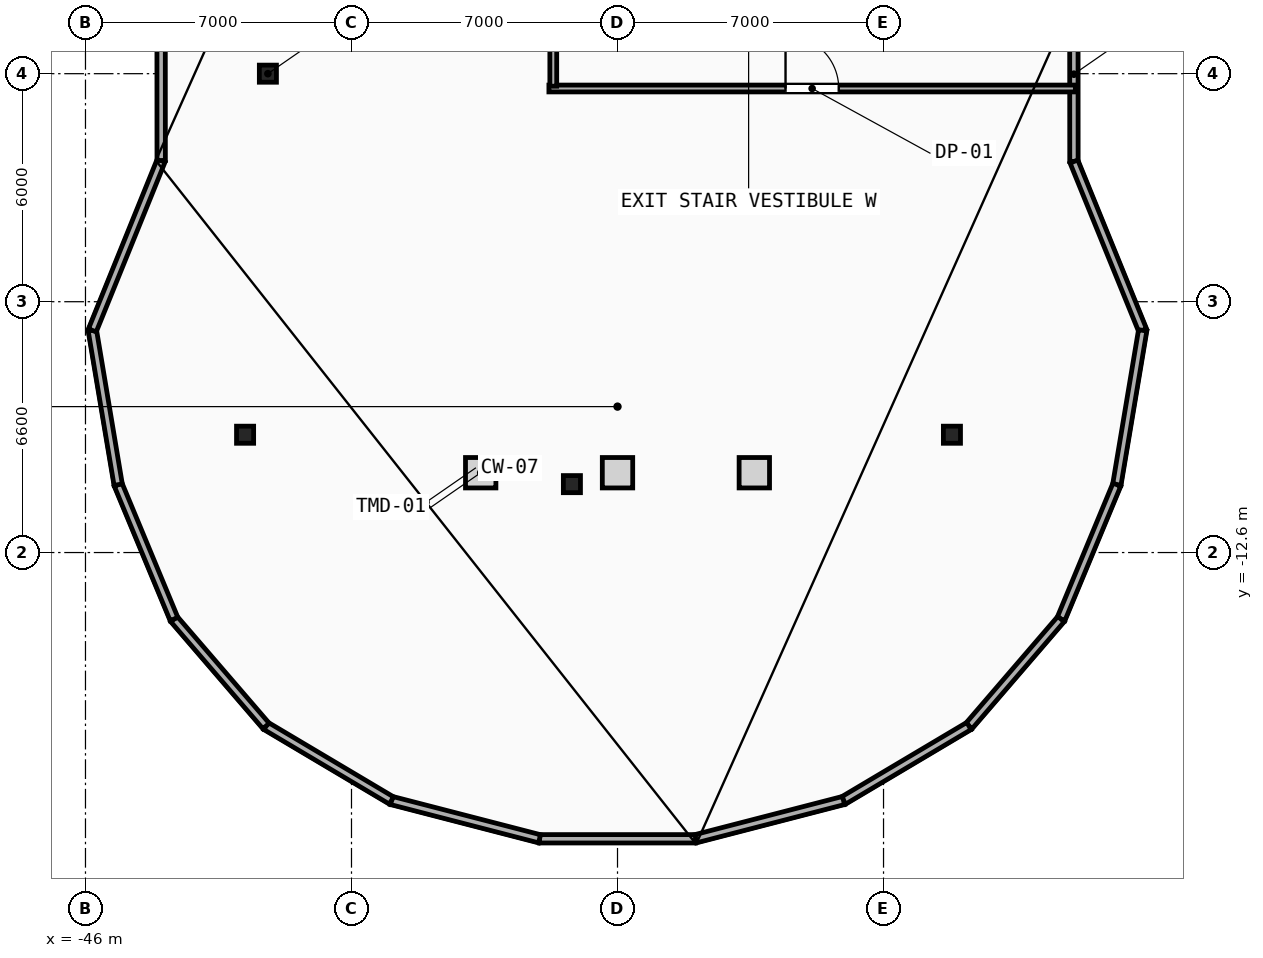
"""IFC4 building model, lengths in metres.
Left out: names, types, materials, properties, quantities, classifications, styles, units other than length and angle.
Written with IfcOpenShell. Run it as: python <this file> out.ifc"""

import sys

from ifc_helpers import new_model, si_unit, direction, frame, frame_2d, origin, origin_2d, place, context, subcontext, project, spatial, rectangle, hollow_rectangle, extrude, element, fill, save


model = new_model("IFC4")
c1 = context("Model", 3, precision=1e-05, world=origin(), true_north=direction((0.0, 1.0)))
c2 = subcontext(c1, "Body", "Model", "MODEL_VIEW")
j1 = project(units=[si_unit("LENGTHUNIT", "METRE"), si_unit("PLANEANGLEUNIT", "RADIAN")], contexts=[c1])
p1 = place(None, origin())
s1 = spatial("IfcSite", under=j1, at=p1, CompositionType="ELEMENT")
p2 = place(p1, origin())
s2 = spatial("IfcBuilding", under=s1, at=p2, CompositionType="ELEMENT")
p3 = place(p2, frame((0.0, 0.0, 286.4)))
s3 = spatial("IfcBuildingStorey", under=s2, at=p3, CompositionType="ELEMENT", Elevation=286.4)
for number, where, z_axis, x_axis in (
    (1, (-41.2, 0.0, 0.0), (0.0, 0.0, 1.0), (1.0, 0.0, 0.0)),
    (2, (-41.8, -9.5, 0.0), (0.0, 0.0, 1.0), (1.0, 0.0, 0.0)),
    (3, (-33.2, -10.8, 0.0), (0.0, 0.0, 1.0), (1.0, 0.0, 0.0)),
    (4, (-23.2, -9.5, 0.0), (0.0, 0.0, 1.0), (1.0, 0.0, 0.0)),
):
    element("IfcColumn", number, at=place(p3, frame(where, z_axis=z_axis, x_axis=x_axis)), inside=s3, PredefinedType="COLUMN", context=c2, shape_type="SweptSolid", body=[
        extrude(hollow_rectangle(XDim=0.45, YDim=0.45, WallThickness=0.025, at=origin_2d()), origin(), (0.0, 0.0, 1.0), 4.93),
    ])
p4 = place(p3, frame((-19.992, 2.284, 5.2), z_axis=(0.0, 0.0, 1.0), x_axis=(0.000531349553, -0.999999858834, 0.0)))
e5 = element("IfcWall", 5, at=p4, inside=s3, PredefinedType="PARAPET", context=c2, shape_type="SweptSolid", body=[
    extrude(rectangle(XDim=4.595, YDim=0.22, at=frame_2d((2.297, 0.0))), origin(), (0.0, 0.0, 1.0), 2.0),
])
p5 = place(p3, frame((-19.99, -2.311, 5.2), z_axis=(0.0, 0.0, 1.0), x_axis=(0.377043082347, -0.926195721246, 0.0)))
e6 = element("IfcWall", 6, at=p5, inside=s3, PredefinedType="PARAPET", context=c2, shape_type="SweptSolid", body=[
    extrude(rectangle(XDim=4.797, YDim=0.22, at=frame_2d((2.399, 0.0))), origin(), (0.0, 0.0, 1.0), 2.0),
])
p6 = place(p3, frame((-18.181, -6.754, 5.2), z_axis=(0.0, 0.0, 1.0), x_axis=(-0.165110628258, -0.986275053135, 0.0)))
e7 = element("IfcWall", 7, at=p6, inside=s3, PredefinedType="PARAPET", context=c2, shape_type="SweptSolid", body=[
    extrude(rectangle(XDim=4.116, YDim=0.22, at=frame_2d((2.058, 0.0))), origin(), (0.0, 0.0, 1.0), 2.0),
])
p7 = place(p3, frame((-18.86, -10.814, 5.2), z_axis=(0.0, 0.0, 1.0), x_axis=(-0.383669064321, -0.923470654154, 0.0)))
e8 = element("IfcWall", 8, at=p7, inside=s3, PredefinedType="PARAPET", context=c2, shape_type="SweptSolid", body=[
    extrude(rectangle(XDim=3.829, YDim=0.22, at=frame_2d((1.915, 0.0))), origin(), (0.0, 0.0, 1.0), 2.0),
])
p8 = place(p3, frame((-20.33, -14.351, 5.2), z_axis=(0.0, 0.0, 1.0), x_axis=(-0.652473840564, -0.757811247858, 0.0)))
e9 = element("IfcWall", 9, at=p8, inside=s3, PredefinedType="PARAPET", context=c2, shape_type="SweptSolid", body=[
    extrude(rectangle(XDim=3.713, YDim=0.22, at=frame_2d((1.856, 0.0))), origin(), (0.0, 0.0, 1.0), 2.0),
])
p9 = place(p3, frame((-22.752, -17.164, 5.2), z_axis=(0.0, 0.0, 1.0), x_axis=(-0.859779697284, -0.5106651272, 0.0)))
e10 = element("IfcWall", 10, at=p9, inside=s3, PredefinedType="PARAPET", context=c2, shape_type="SweptSolid", body=[
    extrude(rectangle(XDim=3.839, YDim=0.22, at=frame_2d((1.919, 0.0))), origin(), (0.0, 0.0, 1.0), 2.0),
])
p10 = place(p3, frame((-26.052, -19.125, 5.2), z_axis=(0.0, 0.0, 1.0), x_axis=(-0.968151728793, -0.250364194795, 0.0)))
e11 = element("IfcWall", 11, at=p10, inside=s3, PredefinedType="PARAPET", context=c2, shape_type="SweptSolid", body=[
    extrude(rectangle(XDim=4.024, YDim=0.22, at=frame_2d((2.012, 0.0))), origin(), (0.0, 0.0, 1.0), 2.0),
])
p11 = place(p3, frame((-29.949, -20.132, 5.2), z_axis=(0.0, 0.0, 1.0), x_axis=(-1.0, 0.0, 0.0)))
e12 = element("IfcWall", 12, at=p11, inside=s3, PredefinedType="PARAPET", context=c2, shape_type="SweptSolid", body=[
    extrude(rectangle(XDim=4.103, YDim=0.22, at=frame_2d((2.051, 0.0))), origin(), (0.0, 0.0, 1.0), 2.0),
])
p12 = place(p3, frame((-34.051, -20.132, 5.2), z_axis=(0.0, 0.0, 1.0), x_axis=(-0.968151728793, 0.250364194795, 0.0)))
e13 = element("IfcWall", 13, at=p12, inside=s3, PredefinedType="PARAPET", context=c2, shape_type="SweptSolid", body=[
    extrude(rectangle(XDim=4.024, YDim=0.22, at=frame_2d((2.012, 0.0))), origin(), (0.0, 0.0, 1.0), 2.0),
])
p13 = place(p3, frame((-37.948, -19.125, 5.2), z_axis=(0.0, 0.0, 1.0), x_axis=(-0.859779697284, 0.5106651272, 0.0)))
e14 = element("IfcWall", 14, at=p13, inside=s3, PredefinedType="PARAPET", context=c2, shape_type="SweptSolid", body=[
    extrude(rectangle(XDim=3.839, YDim=0.22, at=frame_2d((1.919, 0.0))), origin(), (0.0, 0.0, 1.0), 2.0),
])
p14 = place(p3, frame((-41.248, -17.164, 5.2), z_axis=(0.0, 0.0, 1.0), x_axis=(-0.652473840564, 0.757811247858, 0.0)))
e15 = element("IfcWall", 15, at=p14, inside=s3, PredefinedType="PARAPET", context=c2, shape_type="SweptSolid", body=[
    extrude(rectangle(XDim=3.713, YDim=0.22, at=frame_2d((1.856, 0.0))), origin(), (0.0, 0.0, 1.0), 2.0),
])
p15 = place(p3, frame((-43.67, -14.351, 5.2), z_axis=(0.0, 0.0, 1.0), x_axis=(-0.383669064321, 0.923470654154, 0.0)))
e16 = element("IfcWall", 16, at=p15, inside=s3, PredefinedType="PARAPET", context=c2, shape_type="SweptSolid", body=[
    extrude(rectangle(XDim=3.829, YDim=0.22, at=frame_2d((1.915, 0.0))), origin(), (0.0, 0.0, 1.0), 2.0),
])
p16 = place(p3, frame((-45.14, -10.814, 5.2), z_axis=(0.0, 0.0, 1.0), x_axis=(-0.165110628258, 0.986275053135, 0.0)))
e17 = element("IfcWall", 17, at=p16, inside=s3, PredefinedType="PARAPET", context=c2, shape_type="SweptSolid", body=[
    extrude(rectangle(XDim=4.116, YDim=0.22, at=frame_2d((2.058, 0.0))), origin(), (0.0, 0.0, 1.0), 2.0),
])
p17 = place(p3, frame((-45.819, -6.754, 5.2), z_axis=(0.0, 0.0, 1.0), x_axis=(0.375532386136, 0.92680927216, 0.0)))
e18 = element("IfcWall", 18, at=p17, inside=s3, PredefinedType="PARAPET", context=c2, shape_type="SweptSolid", body=[
    extrude(rectangle(XDim=4.823, YDim=0.22, at=frame_2d((2.412, 0.0))), origin(), (0.0, 0.0, 1.0), 2.0),
])
p18 = place(p3, frame((-44.008, -2.284, 5.2), z_axis=(0.0, 0.0, 1.0), x_axis=(-0.000531349553, 0.999999858834, 0.0)))
e19 = element("IfcWall", 19, at=p18, inside=s3, PredefinedType="PARAPET", context=c2, shape_type="SweptSolid", body=[
    extrude(rectangle(XDim=4.595, YDim=0.22, at=frame_2d((2.297, 0.0))), origin(), (0.0, 0.0, 1.0), 2.0),
])
p19 = place(p3, frame((-33.805, -0.39, 0.0), z_axis=(0.0, 0.0, 1.0), x_axis=(1.0, 0.0, 0.0)))
e20 = element("IfcWall", 20, at=p19, inside=s3, PredefinedType="PARTITIONING", context=c2, shape_type="SweptSolid", body=[
    extrude(rectangle(XDim=13.854, YDim=0.18, at=frame_2d((6.927, 0.0))), origin(), (0.0, 0.0, 1.0), 4.93),
])
p20 = place(p19, frame((6.227, 0.0, 0.0)))
e21 = element("IfcOpeningElement", 21, at=p20, cuts=e20, PredefinedType="OPENING", context=c2, shape_type="SweptSolid", body=[
    extrude(rectangle(XDim=1.4, YDim=2.2, at=frame_2d((0.7, 1.1))), frame((0.0, 0.1, 0.0), z_axis=(0.0, -1.0, 0.0), x_axis=(1.0, 0.0, 0.0)), (0.0, 0.0, 1.0), 0.2),
])
p21 = place(p3, frame((-33.69, 17.605, 0.0), z_axis=(0.0, 0.0, 1.0), x_axis=(0.0, -1.0, 0.0)))
e22 = element("IfcWall", 22, at=p21, inside=s3, PredefinedType="PARTITIONING", context=c2, shape_type="SweptSolid", body=[
    extrude(rectangle(XDim=17.935, YDim=0.18, at=frame_2d((8.968, 0.0))), origin(), (0.0, 0.0, 1.0), 4.93),
])
p22 = place(p21, frame((8.268, 0.0, 0.0)))
e23 = element("IfcOpeningElement", 23, at=p22, cuts=e22, PredefinedType="OPENING", context=c2, shape_type="SweptSolid", body=[
    extrude(rectangle(XDim=1.4, YDim=2.2, at=frame_2d((0.7, 1.1))), frame((0.0, 0.1, 0.0), z_axis=(0.0, -1.0, 0.0), x_axis=(1.0, 0.0, 0.0)), (0.0, 0.0, 1.0), 0.2),
])
p23 = place(p20, origin())
e24 = element("IfcDoor", 24, at=p23, inside=s3, OperationType="SINGLE_SWING_LEFT", PredefinedType="DOOR", context=c2, shape_type="SweptSolid", body=[
    extrude(rectangle(XDim=1.4, YDim=2.2, at=frame_2d((0.7, 1.1))), frame((0.0, 0.025, 0.0), z_axis=(0.0, -1.0, 0.0), x_axis=(1.0, 0.0, 0.0)), (0.0, 0.0, 1.0), 0.05),
])
fill(e21, e24)
save(model, sys.argv[1])
